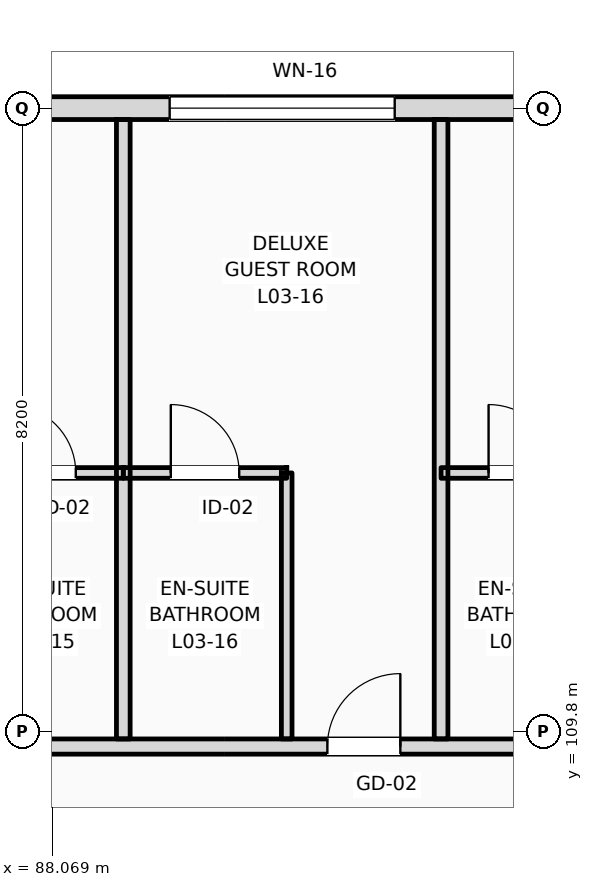
"""IFC4 building model, lengths in metres.
Left out: names, types, materials, properties, quantities, classifications, styles, units other than length and angle.
Written with IfcOpenShell. Run it as: python <this file> out.ifc"""

import sys

from ifc_helpers import new_model, si_unit, direction, frame, frame_2d, origin, place, context, subcontext, project, spatial, rectangle, extrude, element, fill, save


model = new_model("IFC4")
c1 = context("Model", 3, precision=1e-05, world=origin(), true_north=direction((0.0, 1.0)))
c2 = subcontext(c1, "Body", "Model", "MODEL_VIEW")
j1 = project(units=[si_unit("LENGTHUNIT", "METRE"), si_unit("PLANEANGLEUNIT", "RADIAN")], contexts=[c1])
p1 = place(None, origin())
s1 = spatial("IfcSite", under=j1, at=p1, CompositionType="ELEMENT")
p2 = place(p1, origin())
s2 = spatial("IfcBuilding", under=s1, at=p2, CompositionType="ELEMENT")
p3 = place(p2, frame((0.0, 0.0, 16.2)))
s3 = spatial("IfcBuildingStorey", under=s2, at=p3, CompositionType="ELEMENT", Elevation=16.2)
p4 = place(p3, frame((22.5, 118.0, 0.0), z_axis=(0.0, 0.0, 1.0), x_axis=(1.0, 0.0, 0.0)))
e1 = element("IfcWall", 1, at=p4, inside=s3, PredefinedType="STANDARD", context=c2, shape_type="SweptSolid", body=[
    extrude(rectangle(XDim=97.5, YDim=0.3, at=frame_2d((48.75, 0.0))), origin(), (0.0, 0.0, 1.0), 3.36),
])
p5 = place(p4, frame((3.721, 0.0, 0.9)))
e2 = element("IfcOpeningElement", 2, at=p5, cuts=e1, PredefinedType="OPENING", context=c2, shape_type="SweptSolid", body=[
    extrude(rectangle(XDim=0.9, YDim=1.8, at=frame_2d((0.45, 0.9))), frame((0.0, 0.16, 0.0), z_axis=(0.0, -1.0, 0.0), x_axis=(1.0, 0.0, 0.0)), (0.0, 0.0, 1.0), 0.32),
])
p6 = place(p4, frame((6.447, 0.0, 0.9)))
e3 = element("IfcOpeningElement", 3, at=p6, cuts=e1, PredefinedType="OPENING", context=c2, shape_type="SweptSolid", body=[
    extrude(rectangle(XDim=1.35, YDim=1.85, at=frame_2d((0.675, 0.925))), frame((0.0, 0.16, 0.0), z_axis=(0.0, -1.0, 0.0), x_axis=(1.0, 0.0, 0.0)), (0.0, 0.0, 1.0), 0.32),
])
p7 = place(p4, frame((11.363, 0.0, 0.9)))
e4 = element("IfcOpeningElement", 4, at=p7, cuts=e1, PredefinedType="OPENING", context=c2, shape_type="SweptSolid", body=[
    extrude(rectangle(XDim=1.5, YDim=1.9, at=frame_2d((0.75, 0.95))), frame((0.0, 0.16, 0.0), z_axis=(0.0, -1.0, 0.0), x_axis=(1.0, 0.0, 0.0)), (0.0, 0.0, 1.0), 0.32),
])
p8 = place(p4, frame((15.078, 0.0, 0.9)))
e5 = element("IfcOpeningElement", 5, at=p8, cuts=e1, PredefinedType="OPENING", context=c2, shape_type="SweptSolid", body=[
    extrude(rectangle(XDim=1.65, YDim=1.95, at=frame_2d((0.825, 0.975))), frame((0.0, 0.16, 0.0), z_axis=(0.0, -1.0, 0.0), x_axis=(1.0, 0.0, 0.0)), (0.0, 0.0, 1.0), 0.32),
])
p9 = place(p4, frame((19.395, 0.0, 0.9)))
e6 = element("IfcOpeningElement", 6, at=p9, cuts=e1, PredefinedType="OPENING", context=c2, shape_type="SweptSolid", body=[
    extrude(rectangle(XDim=1.8, YDim=2.0, at=frame_2d((0.9, 1.0))), frame((0.0, 0.16, 0.0), z_axis=(0.0, -1.0, 0.0), x_axis=(1.0, 0.0, 0.0)), (0.0, 0.0, 1.0), 0.32),
])
p10 = place(p4, frame((23.31, 0.0, 0.9)))
e7 = element("IfcOpeningElement", 7, at=p10, cuts=e1, PredefinedType="OPENING", context=c2, shape_type="SweptSolid", body=[
    extrude(rectangle(XDim=1.95, YDim=2.05, at=frame_2d((0.975, 1.025))), frame((0.0, 0.16, 0.0), z_axis=(0.0, -1.0, 0.0), x_axis=(1.0, 0.0, 0.0)), (0.0, 0.0, 1.0), 0.32),
])
p11 = place(p4, frame((28.026, 0.0, 0.9)))
e8 = element("IfcOpeningElement", 8, at=p11, cuts=e1, PredefinedType="OPENING", context=c2, shape_type="SweptSolid", body=[
    extrude(rectangle(XDim=2.1, YDim=2.1, at=frame_2d((1.05, 1.05))), frame((0.0, 0.16, 0.0), z_axis=(0.0, -1.0, 0.0), x_axis=(1.0, 0.0, 0.0)), (0.0, 0.0, 1.0), 0.32),
])
p12 = place(p4, frame((31.941, 0.0, 0.9)))
e9 = element("IfcOpeningElement", 9, at=p12, cuts=e1, PredefinedType="OPENING", context=c2, shape_type="SweptSolid", body=[
    extrude(rectangle(XDim=1.1, YDim=2.15, at=frame_2d((0.55, 1.075))), frame((0.0, 0.16, 0.0), z_axis=(0.0, -1.0, 0.0), x_axis=(1.0, 0.0, 0.0)), (0.0, 0.0, 1.0), 0.32),
])
p13 = place(p4, frame((36.657, 0.0, 0.9)))
e10 = element("IfcOpeningElement", 10, at=p13, cuts=e1, PredefinedType="OPENING", context=c2, shape_type="SweptSolid", body=[
    extrude(rectangle(XDim=2.4, YDim=2.2, at=frame_2d((1.2, 1.1))), frame((0.0, 0.16, 0.0), z_axis=(0.0, -1.0, 0.0), x_axis=(1.0, 0.0, 0.0)), (0.0, 0.0, 1.0), 0.32),
])
p14 = place(p4, frame((42.574, 0.0, 0.9)))
e11 = element("IfcOpeningElement", 11, at=p14, cuts=e1, PredefinedType="OPENING", context=c2, shape_type="SweptSolid", body=[
    extrude(rectangle(XDim=1.35, YDim=2.25, at=frame_2d((0.675, 1.125))), frame((0.0, 0.16, 0.0), z_axis=(0.0, -1.0, 0.0), x_axis=(1.0, 0.0, 0.0)), (0.0, 0.0, 1.0), 0.32),
])
p15 = place(p4, frame((45.289, 0.0, 0.9)))
e12 = element("IfcOpeningElement", 12, at=p15, cuts=e1, PredefinedType="OPENING", context=c2, shape_type="SweptSolid", body=[
    extrude(rectangle(XDim=2.7, YDim=2.28, at=frame_2d((1.35, 1.14))), frame((0.0, 0.16, 0.0), z_axis=(0.0, -1.0, 0.0), x_axis=(1.0, 0.0, 0.0)), (0.0, 0.0, 1.0), 0.32),
])
p16 = place(p4, frame((50.406, 0.0, 0.9)))
e13 = element("IfcOpeningElement", 13, at=p16, cuts=e1, PredefinedType="OPENING", context=c2, shape_type="SweptSolid", body=[
    extrude(rectangle(XDim=1.8, YDim=2.28, at=frame_2d((0.9, 1.14))), frame((0.0, 0.16, 0.0), z_axis=(0.0, -1.0, 0.0), x_axis=(1.0, 0.0, 0.0)), (0.0, 0.0, 1.0), 0.32),
])
p17 = place(p4, frame((53.922, 0.0, 0.9)))
e14 = element("IfcOpeningElement", 14, at=p17, cuts=e1, PredefinedType="OPENING", context=c2, shape_type="SweptSolid", body=[
    extrude(rectangle(XDim=1.8, YDim=2.28, at=frame_2d((0.9, 1.14))), frame((0.0, 0.16, 0.0), z_axis=(0.0, -1.0, 0.0), x_axis=(1.0, 0.0, 0.0)), (0.0, 0.0, 1.0), 0.32),
])
p18 = place(p4, frame((58.332, 0.0, 0.9)))
e15 = element("IfcOpeningElement", 15, at=p18, cuts=e1, PredefinedType="OPENING", context=c2, shape_type="SweptSolid", body=[
    extrude(rectangle(XDim=2.961, YDim=2.28, at=frame_2d((1.48, 1.14))), frame((0.0, 0.16, 0.0), z_axis=(0.0, -1.0, 0.0), x_axis=(1.0, 0.0, 0.0)), (0.0, 0.0, 1.0), 0.32),
])
p19 = place(p4, frame((62.513, 0.0, 0.9)))
e16 = element("IfcOpeningElement", 16, at=p19, cuts=e1, PredefinedType="OPENING", context=c2, shape_type="SweptSolid", body=[
    extrude(rectangle(XDim=1.8, YDim=2.28, at=frame_2d((0.9, 1.14))), frame((0.0, 0.16, 0.0), z_axis=(0.0, -1.0, 0.0), x_axis=(1.0, 0.0, 0.0)), (0.0, 0.0, 1.0), 0.32),
])
p20 = place(p4, frame((67.114, 0.0, 0.9)))
e17 = element("IfcOpeningElement", 17, at=p20, cuts=e1, PredefinedType="OPENING", context=c2, shape_type="SweptSolid", body=[
    extrude(rectangle(XDim=2.961, YDim=2.28, at=frame_2d((1.48, 1.14))), frame((0.0, 0.16, 0.0), z_axis=(0.0, -1.0, 0.0), x_axis=(1.0, 0.0, 0.0)), (0.0, 0.0, 1.0), 0.32),
])
p21 = place(p4, frame((73.695, 0.0, 0.9)))
e18 = element("IfcOpeningElement", 18, at=p21, cuts=e1, PredefinedType="OPENING", context=c2, shape_type="SweptSolid", body=[
    extrude(rectangle(XDim=1.1, YDim=2.28, at=frame_2d((0.55, 1.14))), frame((0.0, 0.16, 0.0), z_axis=(0.0, -1.0, 0.0), x_axis=(1.0, 0.0, 0.0)), (0.0, 0.0, 1.0), 0.32),
])
p22 = place(p4, frame((75.895, 0.0, 0.9)))
e19 = element("IfcOpeningElement", 19, at=p22, cuts=e1, PredefinedType="OPENING", context=c2, shape_type="SweptSolid", body=[
    extrude(rectangle(XDim=2.961, YDim=2.28, at=frame_2d((1.48, 1.14))), frame((0.0, 0.16, 0.0), z_axis=(0.0, -1.0, 0.0), x_axis=(1.0, 0.0, 0.0)), (0.0, 0.0, 1.0), 0.32),
])
p23 = place(p4, frame((81.676, 0.0, 0.9)))
e20 = element("IfcOpeningElement", 20, at=p23, cuts=e1, PredefinedType="OPENING", context=c2, shape_type="SweptSolid", body=[
    extrude(rectangle(XDim=1.8, YDim=2.28, at=frame_2d((0.9, 1.14))), frame((0.0, 0.16, 0.0), z_axis=(0.0, -1.0, 0.0), x_axis=(1.0, 0.0, 0.0)), (0.0, 0.0, 1.0), 0.32),
])
p24 = place(p4, frame((84.677, 0.0, 0.9)))
e21 = element("IfcOpeningElement", 21, at=p24, cuts=e1, PredefinedType="OPENING", context=c2, shape_type="SweptSolid", body=[
    extrude(rectangle(XDim=2.961, YDim=2.28, at=frame_2d((1.48, 1.14))), frame((0.0, 0.16, 0.0), z_axis=(0.0, -1.0, 0.0), x_axis=(1.0, 0.0, 0.0)), (0.0, 0.0, 1.0), 0.32),
])
p25 = place(p4, frame((89.999, 0.0, 0.9)))
e22 = element("IfcOpeningElement", 22, at=p25, cuts=e1, PredefinedType="OPENING", context=c2, shape_type="SweptSolid", body=[
    extrude(rectangle(XDim=1.1, YDim=1.5, at=frame_2d((0.55, 0.75))), frame((0.0, 0.16, 0.0), z_axis=(0.0, -1.0, 0.0), x_axis=(1.0, 0.0, 0.0)), (0.0, 0.0, 1.0), 0.32),
])
p26 = place(p4, frame((94.35, 0.0, 0.9)))
e23 = element("IfcOpeningElement", 23, at=p26, cuts=e1, PredefinedType="OPENING", context=c2, shape_type="SweptSolid", body=[
    extrude(rectangle(XDim=1.25, YDim=1.6, at=frame_2d((0.625, 0.8))), frame((0.0, 0.16, 0.0), z_axis=(0.0, -1.0, 0.0), x_axis=(1.0, 0.0, 0.0)), (0.0, 0.0, 1.0), 0.32),
])
p27 = place(p3, frame((10.65, 109.6, 0.0), z_axis=(0.0, 0.0, 1.0), x_axis=(1.0, 0.0, 0.0)))
e24 = element("IfcWall", 24, at=p27, inside=s3, PredefinedType="PARTITIONING", context=c2, shape_type="SweptSolid", body=[
    extrude(rectangle(XDim=109.21, YDim=0.2, at=frame_2d((54.605, 0.0))), origin(), (0.0, 0.0, 1.0), 3.36),
])
p28 = place(p27, frame((15.43, 0.0, 0.0)))
e25 = element("IfcOpeningElement", 25, at=p28, cuts=e24, PredefinedType="OPENING", context=c2, shape_type="SweptSolid", body=[
    extrude(rectangle(XDim=1.02, YDim=2.2, at=frame_2d((0.51, 1.1))), frame((0.0, 0.11, 0.0), z_axis=(0.0, -1.0, 0.0), x_axis=(1.0, 0.0, 0.0)), (0.0, 0.0, 1.0), 0.22),
])
p29 = place(p27, frame((19.537, 0.0, 0.0)))
e26 = element("IfcOpeningElement", 26, at=p29, cuts=e24, PredefinedType="OPENING", context=c2, shape_type="SweptSolid", body=[
    extrude(rectangle(XDim=1.02, YDim=2.2, at=frame_2d((0.51, 1.1))), frame((0.0, 0.11, 0.0), z_axis=(0.0, -1.0, 0.0), x_axis=(1.0, 0.0, 0.0)), (0.0, 0.0, 1.0), 0.22),
])
p30 = place(p27, frame((23.928, 0.0, 0.0)))
e27 = element("IfcOpeningElement", 27, at=p30, cuts=e24, PredefinedType="OPENING", context=c2, shape_type="SweptSolid", body=[
    extrude(rectangle(XDim=1.02, YDim=2.2, at=frame_2d((0.51, 1.1))), frame((0.0, 0.11, 0.0), z_axis=(0.0, -1.0, 0.0), x_axis=(1.0, 0.0, 0.0)), (0.0, 0.0, 1.0), 0.22),
])
p31 = place(p27, frame((26.169, 0.0, 0.0)))
e28 = element("IfcOpeningElement", 28, at=p31, cuts=e24, PredefinedType="OPENING", context=c2, shape_type="SweptSolid", body=[
    extrude(rectangle(XDim=1.02, YDim=2.2, at=frame_2d((0.51, 1.1))), frame((0.0, 0.11, 0.0), z_axis=(0.0, -1.0, 0.0), x_axis=(1.0, 0.0, 0.0)), (0.0, 0.0, 1.0), 0.22),
])
p32 = place(p27, frame((32.739, 0.0, 0.0)))
e29 = element("IfcOpeningElement", 29, at=p32, cuts=e24, PredefinedType="OPENING", context=c2, shape_type="SweptSolid", body=[
    extrude(rectangle(XDim=0.96, YDim=2.2, at=frame_2d((0.48, 1.1))), frame((0.0, 0.11, 0.0), z_axis=(0.0, -1.0, 0.0), x_axis=(1.0, 0.0, 0.0)), (0.0, 0.0, 1.0), 0.22),
])
p33 = place(p27, frame((34.98, 0.0, 0.0)))
e30 = element("IfcOpeningElement", 30, at=p33, cuts=e24, PredefinedType="OPENING", context=c2, shape_type="SweptSolid", body=[
    extrude(rectangle(XDim=0.96, YDim=2.2, at=frame_2d((0.48, 1.1))), frame((0.0, 0.11, 0.0), z_axis=(0.0, -1.0, 0.0), x_axis=(1.0, 0.0, 0.0)), (0.0, 0.0, 1.0), 0.22),
])
p34 = place(p27, frame((41.521, 0.0, 0.0)))
e31 = element("IfcOpeningElement", 31, at=p34, cuts=e24, PredefinedType="OPENING", context=c2, shape_type="SweptSolid", body=[
    extrude(rectangle(XDim=0.96, YDim=2.2, at=frame_2d((0.48, 1.1))), frame((0.0, 0.11, 0.0), z_axis=(0.0, -1.0, 0.0), x_axis=(1.0, 0.0, 0.0)), (0.0, 0.0, 1.0), 0.22),
])
p35 = place(p27, frame((43.512, 0.0, 0.0)))
e32 = element("IfcOpeningElement", 32, at=p35, cuts=e24, PredefinedType="OPENING", context=c2, shape_type="SweptSolid", body=[
    extrude(rectangle(XDim=0.96, YDim=2.2, at=frame_2d((0.48, 1.1))), frame((0.0, 0.11, 0.0), z_axis=(0.0, -1.0, 0.0), x_axis=(1.0, 0.0, 0.0)), (0.0, 0.0, 1.0), 0.22),
])
p36 = place(p27, frame((50.303, 0.0, 0.0)))
e33 = element("IfcOpeningElement", 33, at=p36, cuts=e24, PredefinedType="OPENING", context=c2, shape_type="SweptSolid", body=[
    extrude(rectangle(XDim=0.96, YDim=2.2, at=frame_2d((0.48, 1.1))), frame((0.0, 0.11, 0.0), z_axis=(0.0, -1.0, 0.0), x_axis=(1.0, 0.0, 0.0)), (0.0, 0.0, 1.0), 0.22),
])
p37 = place(p27, frame((54.944, 0.0, 0.0)))
e34 = element("IfcOpeningElement", 34, at=p37, cuts=e24, PredefinedType="OPENING", context=c2, shape_type="SweptSolid", body=[
    extrude(rectangle(XDim=0.96, YDim=2.2, at=frame_2d((0.48, 1.1))), frame((0.0, 0.11, 0.0), z_axis=(0.0, -1.0, 0.0), x_axis=(1.0, 0.0, 0.0)), (0.0, 0.0, 1.0), 0.22),
])
p38 = place(p27, frame((59.085, 0.0, 0.0)))
e35 = element("IfcOpeningElement", 35, at=p38, cuts=e24, PredefinedType="OPENING", context=c2, shape_type="SweptSolid", body=[
    extrude(rectangle(XDim=0.96, YDim=2.2, at=frame_2d((0.48, 1.1))), frame((0.0, 0.11, 0.0), z_axis=(0.0, -1.0, 0.0), x_axis=(1.0, 0.0, 0.0)), (0.0, 0.0, 1.0), 0.22),
])
p39 = place(p27, frame((63.476, 0.0, 0.0)))
e36 = element("IfcOpeningElement", 36, at=p39, cuts=e24, PredefinedType="OPENING", context=c2, shape_type="SweptSolid", body=[
    extrude(rectangle(XDim=0.96, YDim=2.2, at=frame_2d((0.48, 1.1))), frame((0.0, 0.11, 0.0), z_axis=(0.0, -1.0, 0.0), x_axis=(1.0, 0.0, 0.0)), (0.0, 0.0, 1.0), 0.22),
])
p40 = place(p27, frame((65.716, 0.0, 0.0)))
e37 = element("IfcOpeningElement", 37, at=p40, cuts=e24, PredefinedType="OPENING", context=c2, shape_type="SweptSolid", body=[
    extrude(rectangle(XDim=0.96, YDim=2.2, at=frame_2d((0.48, 1.1))), frame((0.0, 0.11, 0.0), z_axis=(0.0, -1.0, 0.0), x_axis=(1.0, 0.0, 0.0)), (0.0, 0.0, 1.0), 0.22),
])
p41 = place(p27, frame((72.257, 0.0, 0.0)))
e38 = element("IfcOpeningElement", 38, at=p41, cuts=e24, PredefinedType="OPENING", context=c2, shape_type="SweptSolid", body=[
    extrude(rectangle(XDim=0.96, YDim=2.2, at=frame_2d((0.48, 1.1))), frame((0.0, 0.11, 0.0), z_axis=(0.0, -1.0, 0.0), x_axis=(1.0, 0.0, 0.0)), (0.0, 0.0, 1.0), 0.22),
])
p42 = place(p27, frame((74.498, 0.0, 0.0)))
e39 = element("IfcOpeningElement", 39, at=p42, cuts=e24, PredefinedType="OPENING", context=c2, shape_type="SweptSolid", body=[
    extrude(rectangle(XDim=0.96, YDim=2.2, at=frame_2d((0.48, 1.1))), frame((0.0, 0.11, 0.0), z_axis=(0.0, -1.0, 0.0), x_axis=(1.0, 0.0, 0.0)), (0.0, 0.0, 1.0), 0.22),
])
p43 = place(p27, frame((81.039, 0.0, 0.0)))
e40 = element("IfcOpeningElement", 40, at=p43, cuts=e24, PredefinedType="OPENING", context=c2, shape_type="SweptSolid", body=[
    extrude(rectangle(XDim=0.96, YDim=2.2, at=frame_2d((0.48, 1.1))), frame((0.0, 0.11, 0.0), z_axis=(0.0, -1.0, 0.0), x_axis=(1.0, 0.0, 0.0)), (0.0, 0.0, 1.0), 0.22),
])
p44 = place(p27, frame((85.68, 0.0, 0.0)))
e41 = element("IfcOpeningElement", 41, at=p44, cuts=e24, PredefinedType="OPENING", context=c2, shape_type="SweptSolid", body=[
    extrude(rectangle(XDim=0.96, YDim=2.2, at=frame_2d((0.48, 1.1))), frame((0.0, 0.11, 0.0), z_axis=(0.0, -1.0, 0.0), x_axis=(1.0, 0.0, 0.0)), (0.0, 0.0, 1.0), 0.22),
])
p45 = place(p27, frame((89.82, 0.0, 0.0)))
e42 = element("IfcOpeningElement", 42, at=p45, cuts=e24, PredefinedType="OPENING", context=c2, shape_type="SweptSolid", body=[
    extrude(rectangle(XDim=0.96, YDim=2.2, at=frame_2d((0.48, 1.1))), frame((0.0, 0.11, 0.0), z_axis=(0.0, -1.0, 0.0), x_axis=(1.0, 0.0, 0.0)), (0.0, 0.0, 1.0), 0.22),
])
p46 = place(p27, frame((94.211, 0.0, 0.0)))
e43 = element("IfcOpeningElement", 43, at=p46, cuts=e24, PredefinedType="OPENING", context=c2, shape_type="SweptSolid", body=[
    extrude(rectangle(XDim=0.96, YDim=2.2, at=frame_2d((0.48, 1.1))), frame((0.0, 0.11, 0.0), z_axis=(0.0, -1.0, 0.0), x_axis=(1.0, 0.0, 0.0)), (0.0, 0.0, 1.0), 0.22),
])
p47 = place(p27, frame((98.602, 0.0, 0.0)))
e44 = element("IfcOpeningElement", 44, at=p47, cuts=e24, PredefinedType="OPENING", context=c2, shape_type="SweptSolid", body=[
    extrude(rectangle(XDim=0.96, YDim=2.2, at=frame_2d((0.48, 1.1))), frame((0.0, 0.11, 0.0), z_axis=(0.0, -1.0, 0.0), x_axis=(1.0, 0.0, 0.0)), (0.0, 0.0, 1.0), 0.22),
])
p48 = place(p27, frame((102.993, 0.0, 0.0)))
e45 = element("IfcOpeningElement", 45, at=p48, cuts=e24, PredefinedType="OPENING", context=c2, shape_type="SweptSolid", body=[
    extrude(rectangle(XDim=0.96, YDim=2.2, at=frame_2d((0.48, 1.1))), frame((0.0, 0.11, 0.0), z_axis=(0.0, -1.0, 0.0), x_axis=(1.0, 0.0, 0.0)), (0.0, 0.0, 1.0), 0.22),
])
p49 = place(p27, frame((105.269, 0.0, 0.0)))
e46 = element("IfcOpeningElement", 46, at=p49, cuts=e24, PredefinedType="OPENING", context=c2, shape_type="SweptSolid", body=[
    extrude(rectangle(XDim=0.96, YDim=2.2, at=frame_2d((0.48, 1.1))), frame((0.0, 0.11, 0.0), z_axis=(0.0, -1.0, 0.0), x_axis=(1.0, 0.0, 0.0)), (0.0, 0.0, 1.0), 0.22),
])
p50 = place(p27, frame((2.716, 0.0, 0.0)))
e47 = element("IfcOpeningElement", 47, at=p50, cuts=e24, PredefinedType="OPENING", context=c2, shape_type="SweptSolid", body=[
    extrude(rectangle(XDim=1.35, YDim=2.25, at=frame_2d((0.675, 1.125))), frame((0.0, 0.11, 0.0), z_axis=(0.0, -1.0, 0.0), x_axis=(1.0, 0.0, 0.0)), (0.0, 0.0, 1.0), 0.22),
])
p51 = place(p27, frame((6.65, 0.0, 0.0)))
e48 = element("IfcOpeningElement", 48, at=p51, cuts=e24, PredefinedType="OPENING", context=c2, shape_type="SweptSolid", body=[
    extrude(rectangle(XDim=1.35, YDim=2.25, at=frame_2d((0.675, 1.125))), frame((0.0, 0.11, 0.0), z_axis=(0.0, -1.0, 0.0), x_axis=(1.0, 0.0, 0.0)), (0.0, 0.0, 1.0), 0.22),
])
p52 = place(p27, frame((10.583, 0.0, 0.0)))
e49 = element("IfcOpeningElement", 49, at=p52, cuts=e24, PredefinedType="OPENING", context=c2, shape_type="SweptSolid", body=[
    extrude(rectangle(XDim=1.35, YDim=2.25, at=frame_2d((0.675, 1.125))), frame((0.0, 0.11, 0.0), z_axis=(0.0, -1.0, 0.0), x_axis=(1.0, 0.0, 0.0)), (0.0, 0.0, 1.0), 0.22),
])
p53 = place(p3, frame((89.004, 109.7, 0.0), z_axis=(0.0, 0.0, 1.0), x_axis=(0.0, 1.0, 0.0)))
e50 = element("IfcWall", 50, at=p53, inside=s3, PredefinedType="PARTITIONING", context=c2, shape_type="SweptSolid", body=[
    extrude(rectangle(XDim=8.15, YDim=0.18, at=frame_2d((4.075, 0.0))), origin(), (0.0, 0.0, 1.0), 3.92),
])
p54 = place(p3, frame((86.854, 113.2, 0.0), z_axis=(0.0, 0.0, 1.0), x_axis=(1.0, 0.0, 0.0)))
e51 = element("IfcWall", 51, at=p54, inside=s3, PredefinedType="PARTITIONING", context=c2, shape_type="SweptSolid", body=[
    extrude(rectangle(XDim=2.15, YDim=0.14, at=frame_2d((1.075, 0.0))), origin(), (0.0, 0.0, 1.0), 3.92),
])
p55 = place(p54, frame((0.625, 0.0, 0.0)))
e52 = element("IfcOpeningElement", 52, at=p55, cuts=e51, PredefinedType="OPENING", context=c2, shape_type="SweptSolid", body=[
    extrude(rectangle(XDim=0.9, YDim=2.1, at=frame_2d((0.45, 1.05))), frame((0.0, 0.08, 0.0), z_axis=(0.0, -1.0, 0.0), x_axis=(1.0, 0.0, 0.0)), (0.0, 0.0, 1.0), 0.16),
])
p56 = place(p3, frame((93.185, 109.7, 0.0), z_axis=(0.0, 0.0, 1.0), x_axis=(0.0, 1.0, 0.0)))
e53 = element("IfcWall", 53, at=p56, inside=s3, PredefinedType="PARTITIONING", context=c2, shape_type="SweptSolid", body=[
    extrude(rectangle(XDim=8.15, YDim=0.18, at=frame_2d((4.075, 0.0))), origin(), (0.0, 0.0, 1.0), 3.92),
])
p57 = place(p3, frame((91.154, 109.7, 0.0), z_axis=(0.0, 0.0, 1.0), x_axis=(0.0, 1.0, 0.0)))
e54 = element("IfcWall", 54, at=p57, inside=s3, PredefinedType="PARTITIONING", context=c2, shape_type="SweptSolid", body=[
    extrude(rectangle(XDim=3.5, YDim=0.14, at=frame_2d((1.75, 0.0))), origin(), (0.0, 0.0, 1.0), 3.92),
])
p58 = place(p3, frame((89.004, 113.2, 0.0), z_axis=(0.0, 0.0, 1.0), x_axis=(1.0, 0.0, 0.0)))
e55 = element("IfcWall", 55, at=p58, inside=s3, PredefinedType="PARTITIONING", context=c2, shape_type="SweptSolid", body=[
    extrude(rectangle(XDim=2.15, YDim=0.14, at=frame_2d((1.075, 0.0))), origin(), (0.0, 0.0, 1.0), 3.92),
])
p59 = place(p58, frame((0.625, 0.0, 0.0)))
e56 = element("IfcOpeningElement", 56, at=p59, cuts=e55, PredefinedType="OPENING", context=c2, shape_type="SweptSolid", body=[
    extrude(rectangle(XDim=0.9, YDim=2.1, at=frame_2d((0.45, 1.05))), frame((0.0, 0.08, 0.0), z_axis=(0.0, -1.0, 0.0), x_axis=(1.0, 0.0, 0.0)), (0.0, 0.0, 1.0), 0.16),
])
p60 = place(p3, frame((93.185, 113.2, 0.0), z_axis=(0.0, 0.0, 1.0), x_axis=(1.0, 0.0, 0.0)))
e57 = element("IfcWall", 57, at=p60, inside=s3, PredefinedType="PARTITIONING", context=c2, shape_type="SweptSolid", body=[
    extrude(rectangle(XDim=2.15, YDim=0.14, at=frame_2d((1.075, 0.0))), origin(), (0.0, 0.0, 1.0), 3.92),
])
p61 = place(p60, frame((0.625, 0.0, 0.0)))
e58 = element("IfcOpeningElement", 58, at=p61, cuts=e57, PredefinedType="OPENING", context=c2, shape_type="SweptSolid", body=[
    extrude(rectangle(XDim=0.9, YDim=2.1, at=frame_2d((0.45, 1.05))), frame((0.0, 0.08, 0.0), z_axis=(0.0, -1.0, 0.0), x_axis=(1.0, 0.0, 0.0)), (0.0, 0.0, 1.0), 0.16),
])
p62 = place(p20, origin())
e59 = element("IfcWindow", 59, at=p62, inside=s3, PartitioningType="DOUBLE_PANEL_VERTICAL", PredefinedType="WINDOW", context=c2, shape_type="SweptSolid", body=[
    extrude(rectangle(XDim=2.961, YDim=2.28, at=frame_2d((1.48, 1.14))), frame((0.0, 0.03, 0.0), z_axis=(0.0, -1.0, 0.0), x_axis=(1.0, 0.0, 0.0)), (0.0, 0.0, 1.0), 0.06),
])
fill(e17, e59)
p63 = place(p55, origin())
e60 = element("IfcDoor", 60, at=p63, inside=s3, OperationType="SINGLE_SWING_LEFT", PredefinedType="DOOR", context=c2, shape_type="SweptSolid", body=[
    extrude(rectangle(XDim=0.9, YDim=2.1, at=frame_2d((0.45, 1.05))), frame((0.0, 0.025, 0.0), z_axis=(0.0, -1.0, 0.0), x_axis=(1.0, 0.0, 0.0)), (0.0, 0.0, 1.0), 0.05),
])
fill(e52, e60)
p64 = place(p43, origin())
e61 = element("IfcDoor", 61, at=p64, inside=s3, OperationType="SINGLE_SWING_RIGHT", PredefinedType="DOOR", context=c2, shape_type="SweptSolid", body=[
    extrude(rectangle(XDim=0.96, YDim=2.2, at=frame_2d((0.48, 1.1))), frame((0.0, 0.025, 0.0), z_axis=(0.0, -1.0, 0.0), x_axis=(1.0, 0.0, 0.0)), (0.0, 0.0, 1.0), 0.05),
])
fill(e40, e61)
p65 = place(p59, origin())
e62 = element("IfcDoor", 62, at=p65, inside=s3, OperationType="SINGLE_SWING_LEFT", PredefinedType="DOOR", context=c2, shape_type="SweptSolid", body=[
    extrude(rectangle(XDim=0.9, YDim=2.1, at=frame_2d((0.45, 1.05))), frame((0.0, 0.025, 0.0), z_axis=(0.0, -1.0, 0.0), x_axis=(1.0, 0.0, 0.0)), (0.0, 0.0, 1.0), 0.05),
])
fill(e56, e62)
p66 = place(p61, origin())
e63 = element("IfcDoor", 63, at=p66, inside=s3, OperationType="SINGLE_SWING_LEFT", PredefinedType="DOOR", context=c2, shape_type="SweptSolid", body=[
    extrude(rectangle(XDim=0.9, YDim=2.1, at=frame_2d((0.45, 1.05))), frame((0.0, 0.025, 0.0), z_axis=(0.0, -1.0, 0.0), x_axis=(1.0, 0.0, 0.0)), (0.0, 0.0, 1.0), 0.05),
])
fill(e58, e63)
save(model, sys.argv[1])
